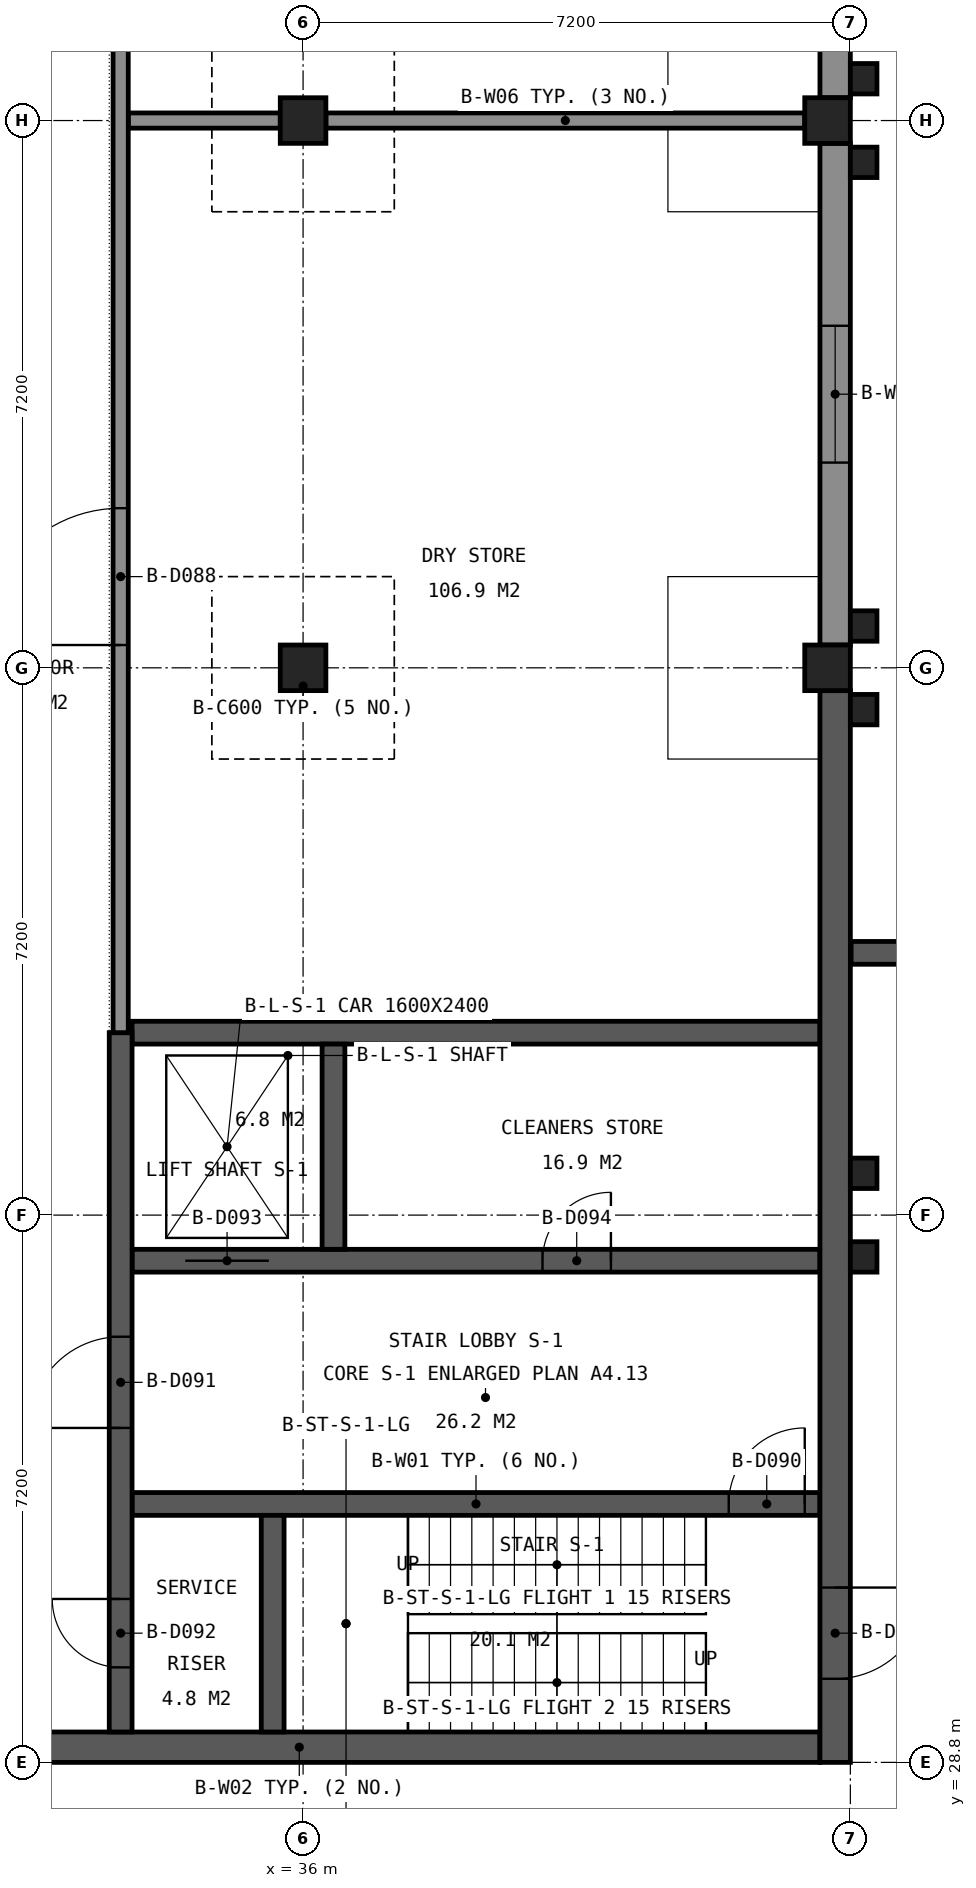
"""IFC4 building model, lengths in metres.
Left out: names, types, materials, properties, quantities, classifications, styles, units other than length and angle.
Written with IfcOpenShell. Run it as: python <this file> out.ifc"""

import sys

from ifc_helpers import new_model, si_unit, direction, frame, frame_2d, origin, origin_2d, place, context, subcontext, project, spatial, rectangle, extrude, element, fill, save


model = new_model("IFC4")
c1 = context("Model", 3, precision=1e-05, world=origin(), true_north=direction((0.0, 1.0)))
c2 = subcontext(c1, "Body", "Model", "MODEL_VIEW")
j1 = project(units=[si_unit("LENGTHUNIT", "METRE"), si_unit("PLANEANGLEUNIT", "RADIAN")], contexts=[c1])
p1 = place(None, origin())
s1 = spatial("IfcSite", under=j1, at=p1, CompositionType="ELEMENT")
p2 = place(p1, origin())
s2 = spatial("IfcBuilding", under=s1, at=p2, CompositionType="ELEMENT")
p3 = place(p2, origin())
s3 = spatial("IfcBuildingStorey", under=s2, at=p3, CompositionType="ELEMENT", Elevation=0.0)
for number, where, z_axis, x_axis in (
    (1, (36.0, 43.2, 0.0), (0.0, 0.0, 1.0), (1.0, 0.0, 0.0)),
    (2, (36.0, 50.4, 0.0), (0.0, 0.0, 1.0), (1.0, 0.0, 0.0)),
    (3, (42.9, 43.2, 0.0), (0.0, 0.0, 1.0), (1.0, 0.0, 0.0)),
    (4, (42.9, 50.4, 0.0), (0.0, 0.0, 1.0), (1.0, 0.0, 0.0)),
):
    element("IfcColumn", number, at=place(p3, frame(where, z_axis=z_axis, x_axis=x_axis)), inside=s3, PredefinedType="COLUMN", context=c2, shape_type="SweptSolid", body=[
        extrude(rectangle(XDim=0.6, YDim=0.6, at=origin_2d()), origin(), (0.0, 0.0, 1.0), 4.8),
    ])
p4 = place(p3, frame((29.1, 29.0, 0.0), z_axis=(0.0, 0.0, 1.0), x_axis=(1.0, 0.0, 0.0)))
e5 = element("IfcWall", 5, at=p4, inside=s3, PredefinedType="SHEAR", context=c2, shape_type="SweptSolid", body=[
    extrude(rectangle(XDim=13.7, YDim=0.4, at=frame_2d((6.85, 0.0))), origin(), (0.0, 0.0, 1.0), 4.55),
])
p5 = place(p3, frame((33.75, 32.2, 0.0), z_axis=(0.0, 0.0, 1.0), x_axis=(1.0, 0.0, 0.0)))
e6 = element("IfcWall", 6, at=p5, inside=s3, PredefinedType="SHEAR", context=c2, shape_type="SweptSolid", body=[
    extrude(rectangle(XDim=9.05, YDim=0.3, at=frame_2d((4.525, 0.0))), origin(), (0.0, 0.0, 1.0), 4.55),
])
p6 = place(p5, frame((7.85, 0.0, 0.0)))
e7 = element("IfcOpeningElement", 7, at=p6, cuts=e6, PredefinedType="OPENING", context=c2, shape_type="SweptSolid", body=[
    extrude(rectangle(XDim=1.0, YDim=2.1, at=frame_2d((0.5, 1.05))), frame((0.0, 0.16, 0.0), z_axis=(0.0, -1.0, 0.0), x_axis=(1.0, 0.0, 0.0)), (0.0, 0.0, 1.0), 0.32),
])
p7 = place(p3, frame((33.75, 35.4, 0.0), z_axis=(0.0, 0.0, 1.0), x_axis=(1.0, 0.0, 0.0)))
e8 = element("IfcWall", 8, at=p7, inside=s3, PredefinedType="SHEAR", context=c2, shape_type="SweptSolid", body=[
    extrude(rectangle(XDim=9.05, YDim=0.3, at=frame_2d((4.525, 0.0))), origin(), (0.0, 0.0, 1.0), 4.55),
])
p8 = place(p7, frame((0.7, 0.0, 0.0)))
e9 = element("IfcOpeningElement", 9, at=p8, cuts=e8, PredefinedType="OPENING", context=c2, shape_type="SweptSolid", body=[
    extrude(rectangle(XDim=1.1, YDim=2.1, at=frame_2d((0.55, 1.05))), frame((0.0, 0.16, 0.0), z_axis=(0.0, -1.0, 0.0), x_axis=(1.0, 0.0, 0.0)), (0.0, 0.0, 1.0), 0.32),
])
p9 = place(p7, frame((5.4, 0.0, 0.0)))
e10 = element("IfcOpeningElement", 10, at=p9, cuts=e8, PredefinedType="OPENING", context=c2, shape_type="SweptSolid", body=[
    extrude(rectangle(XDim=0.9, YDim=2.1, at=frame_2d((0.45, 1.05))), frame((0.0, 0.16, 0.0), z_axis=(0.0, -1.0, 0.0), x_axis=(1.0, 0.0, 0.0)), (0.0, 0.0, 1.0), 0.32),
])
p10 = place(p3, frame((33.75, 38.4, 0.0), z_axis=(0.0, 0.0, 1.0), x_axis=(1.0, 0.0, 0.0)))
e11 = element("IfcWall", 11, at=p10, inside=s3, PredefinedType="SHEAR", context=c2, shape_type="SweptSolid", body=[
    extrude(rectangle(XDim=9.05, YDim=0.3, at=frame_2d((4.525, 0.0))), origin(), (0.0, 0.0, 1.0), 4.55),
])
p11 = place(p3, frame((33.6, 29.2, 0.0), z_axis=(0.0, 0.0, 1.0), x_axis=(0.0, 1.0, 0.0)))
e12 = element("IfcWall", 12, at=p11, inside=s3, PredefinedType="SHEAR", context=c2, shape_type="SweptSolid", body=[
    extrude(rectangle(XDim=9.2, YDim=0.3, at=frame_2d((4.6, 0.0))), origin(), (0.0, 0.0, 1.0), 4.55),
])
p12 = place(p11, frame((4.0, 0.0, 0.0)))
e13 = element("IfcOpeningElement", 13, at=p12, cuts=e12, PredefinedType="OPENING", context=c2, shape_type="SweptSolid", body=[
    extrude(rectangle(XDim=1.2, YDim=2.1, at=frame_2d((0.6, 1.05))), frame((0.0, 0.16, 0.0), z_axis=(0.0, -1.0, 0.0), x_axis=(1.0, 0.0, 0.0)), (0.0, 0.0, 1.0), 0.32),
])
p13 = place(p11, frame((0.85, 0.0, 0.0)))
e14 = element("IfcOpeningElement", 14, at=p13, cuts=e12, PredefinedType="OPENING", context=c2, shape_type="SweptSolid", body=[
    extrude(rectangle(XDim=0.9, YDim=2.1, at=frame_2d((0.45, 1.05))), frame((0.0, 0.16, 0.0), z_axis=(0.0, -1.0, 0.0), x_axis=(1.0, 0.0, 0.0)), (0.0, 0.0, 1.0), 0.32),
])
p14 = place(p3, frame((35.6, 29.2, 0.0), z_axis=(0.0, 0.0, 1.0), x_axis=(0.0, 1.0, 0.0)))
e15 = element("IfcWall", 15, at=p14, inside=s3, PredefinedType="SHEAR", context=c2, shape_type="SweptSolid", body=[
    extrude(rectangle(XDim=2.85, YDim=0.3, at=frame_2d((1.425, 0.0))), origin(), (0.0, 0.0, 1.0), 4.55),
])
p15 = place(p3, frame((36.4, 35.55, -1.2), z_axis=(0.0, 0.0, 1.0), x_axis=(0.0, 1.0, 0.0)))
e16 = element("IfcWall", 16, at=p15, inside=s3, PredefinedType="SHEAR", context=c2, shape_type="SweptSolid", body=[
    extrude(rectangle(XDim=2.7, YDim=0.3, at=frame_2d((1.35, 0.0))), origin(), (0.0, 0.0, 1.0), 5.75),
])
p16 = place(p3, frame((43.0, 28.8, 0.0), z_axis=(0.0, 0.0, 1.0), x_axis=(0.0, 1.0, 0.0)))
e17 = element("IfcWall", 17, at=p16, inside=s3, PredefinedType="SHEAR", context=c2, shape_type="SweptSolid", body=[
    extrude(rectangle(XDim=14.1, YDim=0.4, at=frame_2d((7.05, 0.0))), origin(), (0.0, 0.0, 1.0), 4.55),
])
p17 = place(p16, frame((2.3, 0.0, 0.0), z_axis=(0.0, 0.0, 1.0), x_axis=(-1.0, 0.0, 0.0)))
e18 = element("IfcOpeningElement", 18, at=p17, cuts=e17, PredefinedType="OPENING", context=c2, shape_type="SweptSolid", body=[
    extrude(rectangle(XDim=1.2, YDim=2.1, at=frame_2d((0.6, 1.05))), frame((0.0, 0.21, 0.0), z_axis=(0.0, -1.0, 0.0), x_axis=(1.0, 0.0, 0.0)), (0.0, 0.0, 1.0), 0.42),
])
p18 = place(p3, frame((43.21, 39.45, -0.25), z_axis=(0.0, 0.0, 1.0), x_axis=(1.0, 0.0, 0.0)))
e19 = element("IfcWall", 19, at=p18, inside=s3, PredefinedType="SOLIDWALL", context=c2, shape_type="SweptSolid", body=[
    extrude(rectangle(XDim=7.18, YDim=0.3, at=frame_2d((3.59, 0.0))), origin(), (0.0, 0.0, 1.0), 6.15),
])
p19 = place(p3, frame((43.0, 43.5, 0.0), z_axis=(0.0, 0.0, 1.0), x_axis=(0.0, 1.0, 0.0)))
e20 = element("IfcWall", 20, at=p19, inside=s3, PredefinedType="SOLIDWALL", context=c2, shape_type="SweptSolid", body=[
    extrude(rectangle(XDim=6.6, YDim=0.4, at=frame_2d((3.3, 0.0))), origin(), (0.0, 0.0, 1.0), 3.95),
])
p20 = place(p19, frame((2.4, 0.0, 2.0)))
e21 = element("IfcOpeningElement", 21, at=p20, cuts=e20, PredefinedType="OPENING", context=c2, shape_type="SweptSolid", body=[
    extrude(rectangle(XDim=1.8, YDim=1.5, at=frame_2d((0.9, 0.75))), frame((0.0, 0.21, 0.0), z_axis=(0.0, -1.0, 0.0), x_axis=(1.0, 0.0, 0.0)), (0.0, 0.0, 1.0), 0.42),
])
p21 = place(p3, frame((43.0, 50.7, 0.0), z_axis=(0.0, 0.0, 1.0), x_axis=(0.0, 1.0, 0.0)))
e22 = element("IfcWall", 22, at=p21, inside=s3, PredefinedType="SOLIDWALL", context=c2, shape_type="SweptSolid", body=[
    extrude(rectangle(XDim=6.6, YDim=0.4, at=frame_2d((3.3, 0.0))), origin(), (0.0, 0.0, 1.0), 3.95),
])
p22 = place(p21, frame((2.4, 0.0, 2.0)))
e23 = element("IfcOpeningElement", 23, at=p22, cuts=e22, PredefinedType="OPENING", context=c2, shape_type="SweptSolid", body=[
    extrude(rectangle(XDim=1.8, YDim=1.5, at=frame_2d((0.9, 0.75))), frame((0.0, 0.21, 0.0), z_axis=(0.0, -1.0, 0.0), x_axis=(1.0, 0.0, 0.0)), (0.0, 0.0, 1.0), 0.42),
])
for number, where, z_axis, x_axis in (
    (24, (43.375, 35.45, -0.25), (0.0, 0.0, 1.0), (1.0, 0.0, 0.0)),
    (25, (43.375, 36.55, -0.25), (0.0, 0.0, 1.0), (1.0, 0.0, 0.0)),
    (26, (43.375, 42.65, -0.25), (0.0, 0.0, 1.0), (1.0, 0.0, 0.0)),
    (27, (43.375, 43.75, -0.25), (0.0, 0.0, 1.0), (1.0, 0.0, 0.0)),
    (28, (43.375, 49.85, -0.25), (0.0, 0.0, 1.0), (1.0, 0.0, 0.0)),
    (29, (43.375, 50.95, -0.25), (0.0, 0.0, 1.0), (1.0, 0.0, 0.0)),
):
    element("IfcColumn", number, at=place(p3, frame(where, z_axis=z_axis, x_axis=x_axis)), inside=s3, PredefinedType="COLUMN", context=c2, shape_type="SweptSolid", body=[
        extrude(rectangle(XDim=0.35, YDim=0.4, at=origin_2d()), origin(), (0.0, 0.0, 1.0), 5.05),
    ])
p23 = place(p3, frame((43.26, 28.8, 0.0), z_axis=(0.0, 0.0, 1.0), x_axis=(0.0, 1.0, 0.0)))
e30 = element("IfcWall", 30, at=p23, inside=s3, PredefinedType="SOLIDWALL", context=c2, shape_type="SweptSolid", body=[
    extrude(rectangle(XDim=0.8, YDim=0.12, at=frame_2d((0.4, 0.0))), origin(), (0.0, 0.0, 1.0), 0.6),
])
p24 = place(p3, frame((43.26, 31.2, 0.0), z_axis=(0.0, 0.0, 1.0), x_axis=(0.0, 1.0, 0.0)))
e31 = element("IfcWall", 31, at=p24, inside=s3, PredefinedType="SOLIDWALL", context=c2, shape_type="SweptSolid", body=[
    extrude(rectangle(XDim=4.05, YDim=0.12, at=frame_2d((2.025, 0.0))), origin(), (0.0, 0.0, 1.0), 0.6),
])
p25 = place(p3, frame((43.26, 35.65, 0.0), z_axis=(0.0, 0.0, 1.0), x_axis=(0.0, 1.0, 0.0)))
e32 = element("IfcWall", 32, at=p25, inside=s3, PredefinedType="SOLIDWALL", context=c2, shape_type="SweptSolid", body=[
    extrude(rectangle(XDim=0.7, YDim=0.12, at=frame_2d((0.35, 0.0))), origin(), (0.0, 0.0, 1.0), 0.6),
])
p26 = place(p3, frame((43.26, 36.75, 0.0), z_axis=(0.0, 0.0, 1.0), x_axis=(0.0, 1.0, 0.0)))
e33 = element("IfcWall", 33, at=p26, inside=s3, PredefinedType="SOLIDWALL", context=c2, shape_type="SweptSolid", body=[
    extrude(rectangle(XDim=5.7, YDim=0.12, at=frame_2d((2.85, 0.0))), origin(), (0.0, 0.0, 1.0), 0.6),
])
p27 = place(p3, frame((43.26, 42.85, 0.0), z_axis=(0.0, 0.0, 1.0), x_axis=(0.0, 1.0, 0.0)))
e34 = element("IfcWall", 34, at=p27, inside=s3, PredefinedType="SOLIDWALL", context=c2, shape_type="SweptSolid", body=[
    extrude(rectangle(XDim=0.7, YDim=0.12, at=frame_2d((0.35, 0.0))), origin(), (0.0, 0.0, 1.0), 0.6),
])
p28 = place(p3, frame((43.26, 43.95, 0.0), z_axis=(0.0, 0.0, 1.0), x_axis=(0.0, 1.0, 0.0)))
e35 = element("IfcWall", 35, at=p28, inside=s3, PredefinedType="SOLIDWALL", context=c2, shape_type="SweptSolid", body=[
    extrude(rectangle(XDim=5.7, YDim=0.12, at=frame_2d((2.85, 0.0))), origin(), (0.0, 0.0, 1.0), 0.6),
])
p29 = place(p3, frame((43.26, 50.05, 0.0), z_axis=(0.0, 0.0, 1.0), x_axis=(0.0, 1.0, 0.0)))
e36 = element("IfcWall", 36, at=p29, inside=s3, PredefinedType="SOLIDWALL", context=c2, shape_type="SweptSolid", body=[
    extrude(rectangle(XDim=0.7, YDim=0.12, at=frame_2d((0.35, 0.0))), origin(), (0.0, 0.0, 1.0), 0.6),
])
p30 = place(p3, frame((43.26, 51.15, 0.0), z_axis=(0.0, 0.0, 1.0), x_axis=(0.0, 1.0, 0.0)))
e37 = element("IfcWall", 37, at=p30, inside=s3, PredefinedType="SOLIDWALL", context=c2, shape_type="SweptSolid", body=[
    extrude(rectangle(XDim=5.7, YDim=0.12, at=frame_2d((2.85, 0.0))), origin(), (0.0, 0.0, 1.0), 0.6),
])
p31 = place(p3, frame((33.7, 50.4, 0.0), z_axis=(0.0, 0.0, 1.0), x_axis=(1.0, 0.0, 0.0)))
e38 = element("IfcWall", 38, at=p31, inside=s3, PredefinedType="PARTITIONING", context=c2, shape_type="SweptSolid", body=[
    extrude(rectangle(XDim=2.0, YDim=0.2, at=frame_2d((1.0, 0.0))), origin(), (0.0, 0.0, 1.0), 3.95),
])
p32 = place(p3, frame((36.3, 50.4, 0.0), z_axis=(0.0, 0.0, 1.0), x_axis=(1.0, 0.0, 0.0)))
e39 = element("IfcWall", 39, at=p32, inside=s3, PredefinedType="PARTITIONING", context=c2, shape_type="SweptSolid", body=[
    extrude(rectangle(XDim=6.3, YDim=0.2, at=frame_2d((3.15, 0.0))), origin(), (0.0, 0.0, 1.0), 3.95),
])
p33 = place(p3, frame((33.6, 38.4, 0.0), z_axis=(0.0, 0.0, 1.0), x_axis=(0.0, 1.0, 0.0)))
e40 = element("IfcWall", 40, at=p33, inside=s3, PredefinedType="PARTITIONING", context=c2, shape_type="SweptSolid", body=[
    extrude(rectangle(XDim=24.0, YDim=0.2, at=frame_2d((12.0, 0.0))), origin(), (0.0, 0.0, 1.0), 3.95),
])
p34 = place(p33, frame((5.1, 0.0, 0.0)))
e41 = element("IfcOpeningElement", 41, at=p34, cuts=e40, PredefinedType="OPENING", context=c2, shape_type="SweptSolid", body=[
    extrude(rectangle(XDim=1.8, YDim=2.1, at=frame_2d((0.9, 1.05))), frame((0.0, 0.11, 0.0), z_axis=(0.0, -1.0, 0.0), x_axis=(1.0, 0.0, 0.0)), (0.0, 0.0, 1.0), 0.22),
])
p35 = place(p33, frame((17.1, 0.0, 0.0)))
e42 = element("IfcOpeningElement", 42, at=p35, cuts=e40, PredefinedType="OPENING", context=c2, shape_type="SweptSolid", body=[
    extrude(rectangle(XDim=1.8, YDim=2.1, at=frame_2d((0.9, 1.05))), frame((0.0, 0.11, 0.0), z_axis=(0.0, -1.0, 0.0), x_axis=(1.0, 0.0, 0.0)), (0.0, 0.0, 1.0), 0.22),
])
p36 = place(p17, origin())
e43 = element("IfcDoor", 43, at=p36, inside=s3, OperationType="SINGLE_SWING_LEFT", PredefinedType="DOOR", context=c2, shape_type="SweptSolid", body=[
    extrude(rectangle(XDim=1.2, YDim=2.1, at=frame_2d((0.6, 1.05))), frame((0.0, 0.025, 0.0), z_axis=(0.0, -1.0, 0.0), x_axis=(1.0, 0.0, 0.0)), (0.0, 0.0, 1.0), 0.05),
])
fill(e18, e43)
p37 = place(p20, origin())
e44 = element("IfcWindow", 44, at=p37, inside=s3, PartitioningType="SINGLE_PANEL", PredefinedType="WINDOW", context=c2, shape_type="SweptSolid", body=[
    extrude(rectangle(XDim=1.8, YDim=1.5, at=frame_2d((0.9, 0.75))), frame((0.0, 0.03, 0.0), z_axis=(0.0, -1.0, 0.0), x_axis=(1.0, 0.0, 0.0)), (0.0, 0.0, 1.0), 0.06),
])
fill(e21, e44)
p38 = place(p34, origin())
e45 = element("IfcDoor", 45, at=p38, inside=s3, OperationType="DOUBLE_DOOR_DOUBLE_SWING", PredefinedType="DOOR", context=c2, shape_type="SweptSolid", body=[
    extrude(rectangle(XDim=1.8, YDim=2.1, at=frame_2d((0.9, 1.05))), frame((0.0, 0.025, 0.0), z_axis=(0.0, -1.0, 0.0), x_axis=(1.0, 0.0, 0.0)), (0.0, 0.0, 1.0), 0.05),
])
fill(e41, e45)
p39 = place(p6, origin())
e46 = element("IfcDoor", 46, at=p39, inside=s3, OperationType="SINGLE_SWING_RIGHT", PredefinedType="DOOR", context=c2, shape_type="SweptSolid", body=[
    extrude(rectangle(XDim=1.0, YDim=2.1, at=frame_2d((0.5, 1.05))), frame((0.0, 0.025, 0.0), z_axis=(0.0, -1.0, 0.0), x_axis=(1.0, 0.0, 0.0)), (0.0, 0.0, 1.0), 0.05),
])
fill(e7, e46)
p40 = place(p12, origin())
e47 = element("IfcDoor", 47, at=p40, inside=s3, OperationType="SINGLE_SWING_LEFT", PredefinedType="DOOR", context=c2, shape_type="SweptSolid", body=[
    extrude(rectangle(XDim=1.2, YDim=2.1, at=frame_2d((0.6, 1.05))), frame((0.0, 0.025, 0.0), z_axis=(0.0, -1.0, 0.0), x_axis=(1.0, 0.0, 0.0)), (0.0, 0.0, 1.0), 0.05),
])
fill(e13, e47)
p41 = place(p13, origin())
e48 = element("IfcDoor", 48, at=p41, inside=s3, OperationType="SINGLE_SWING_RIGHT", PredefinedType="DOOR", context=c2, shape_type="SweptSolid", body=[
    extrude(rectangle(XDim=0.9, YDim=2.1, at=frame_2d((0.45, 1.05))), frame((0.0, 0.025, 0.0), z_axis=(0.0, -1.0, 0.0), x_axis=(1.0, 0.0, 0.0)), (0.0, 0.0, 1.0), 0.05),
])
fill(e14, e48)
p42 = place(p8, origin())
e49 = element("IfcDoor", 49, at=p42, inside=s3, OperationType="SLIDING_TO_LEFT", PredefinedType="DOOR", context=c2, shape_type="SweptSolid", body=[
    extrude(rectangle(XDim=1.1, YDim=2.1, at=frame_2d((0.55, 1.05))), frame((0.0, 0.025, 0.0), z_axis=(0.0, -1.0, 0.0), x_axis=(1.0, 0.0, 0.0)), (0.0, 0.0, 1.0), 0.05),
])
fill(e9, e49)
p43 = place(p9, origin())
e50 = element("IfcDoor", 50, at=p43, inside=s3, OperationType="SINGLE_SWING_RIGHT", PredefinedType="DOOR", context=c2, shape_type="SweptSolid", body=[
    extrude(rectangle(XDim=0.9, YDim=2.1, at=frame_2d((0.45, 1.05))), frame((0.0, 0.025, 0.0), z_axis=(0.0, -1.0, 0.0), x_axis=(1.0, 0.0, 0.0)), (0.0, 0.0, 1.0), 0.05),
])
fill(e10, e50)
save(model, sys.argv[1])
